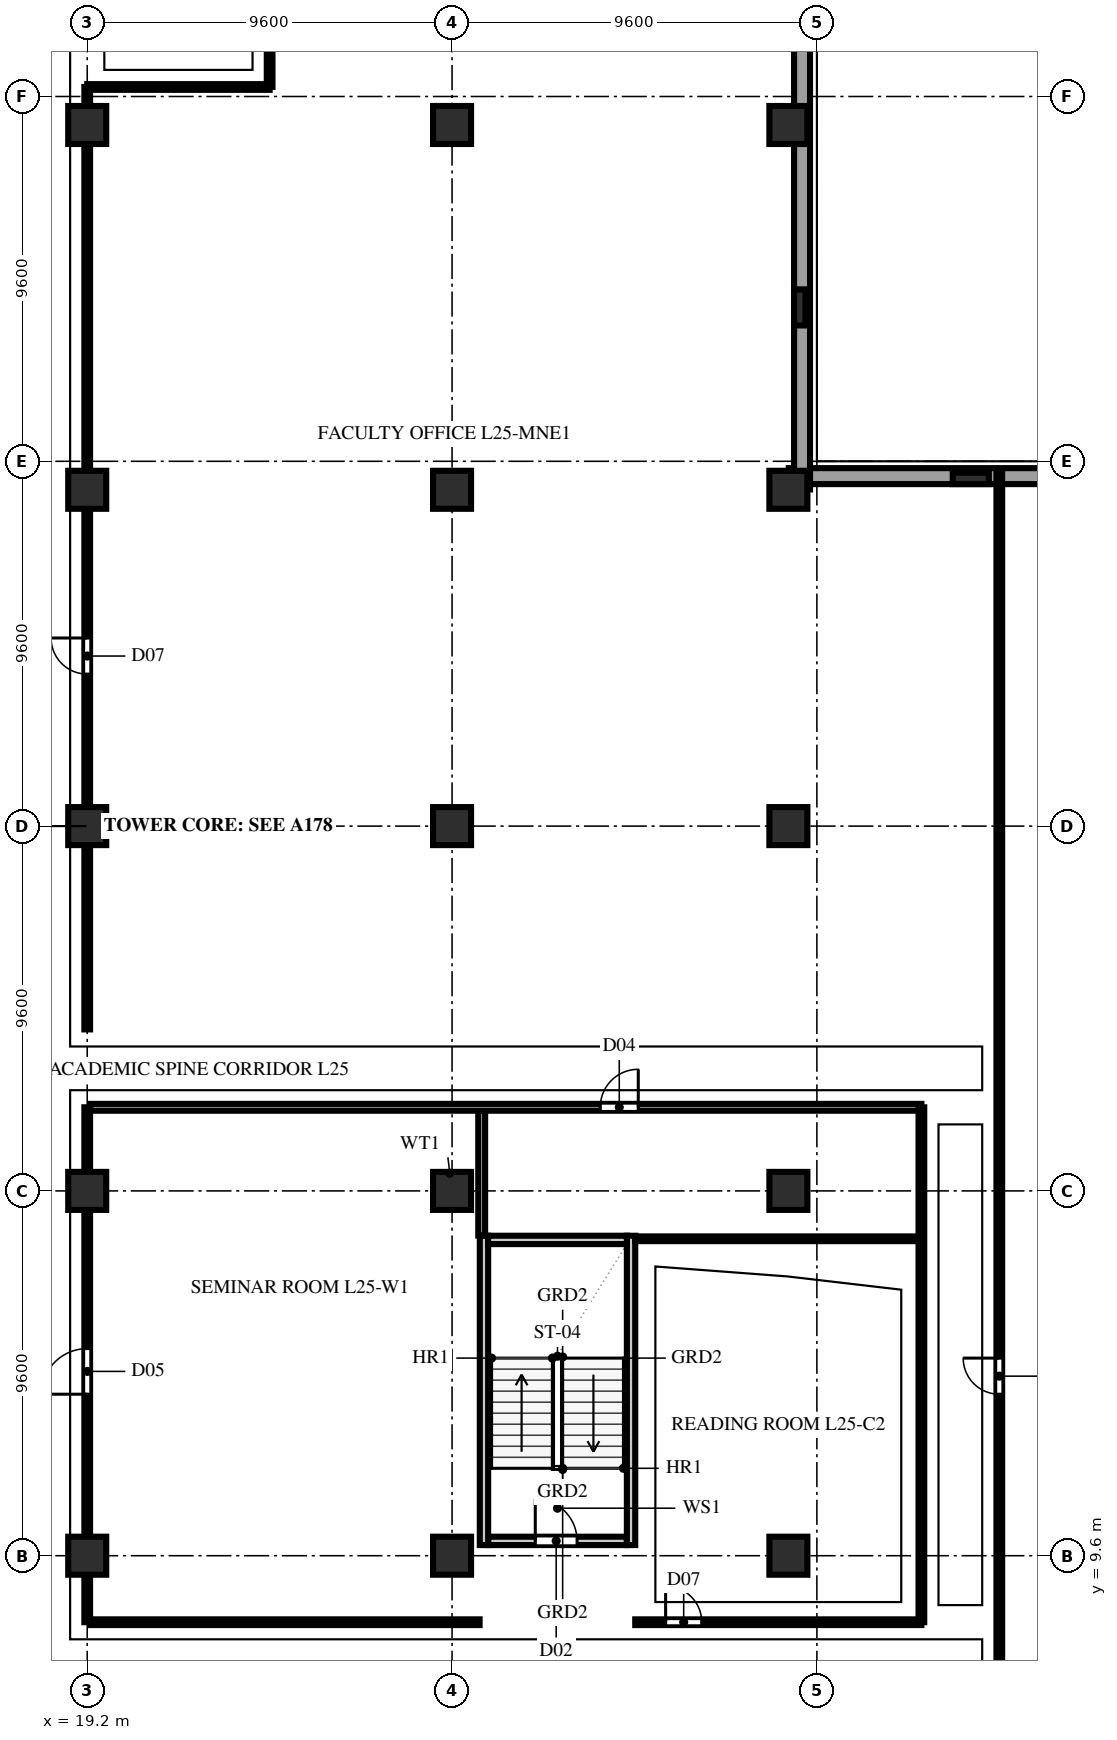
"""IFC4 building model, lengths in metres.
Left out: names, types, materials, properties, quantities, classifications, styles, units other than length and angle.
Written with IfcOpenShell. Run it as: python <this file> out.ifc"""

import sys

from ifc_helpers import new_model, si_unit, direction, frame, frame_2d, origin, origin_2d, place, context, subcontext, project, spatial, rectangle, extrude, element, fill, save


model = new_model("IFC4")
c1 = context("Model", 3, precision=1e-05, world=origin(), true_north=direction((0.0, 1.0)))
c2 = subcontext(c1, "Body", "Model", "MODEL_VIEW")
j1 = project(units=[si_unit("LENGTHUNIT", "METRE"), si_unit("PLANEANGLEUNIT", "RADIAN")], contexts=[c1])
p1 = place(None, origin())
s1 = spatial("IfcSite", under=j1, at=p1, CompositionType="ELEMENT")
p2 = place(p1, origin())
s2 = spatial("IfcBuilding", under=s1, at=p2, CompositionType="ELEMENT")
p3 = place(p2, frame((0.0, 0.0, 101.4)))
s3 = spatial("IfcBuildingStorey", under=s2, at=p3, CompositionType="ELEMENT", Elevation=101.4)
for number, where, z_axis, x_axis in (
    (1, (19.2, 9.6, 0.0), (0.0, 0.0, 1.0), (1.0, 0.0, 0.0)),
    (2, (19.2, 19.2, 0.0), (0.0, 0.0, 1.0), (1.0, 0.0, 0.0)),
    (3, (19.2, 28.8, 0.0), (0.0, 0.0, 1.0), (1.0, 0.0, 0.0)),
    (4, (19.2, 37.65, 0.0), (0.0, 0.0, 1.0), (1.0, 0.0, 0.0)),
    (5, (19.2, 47.25, 0.0), (0.0, 0.0, 1.0), (1.0, 0.0, 0.0)),
    (6, (28.8, 9.6, 0.0), (0.0, 0.0, 1.0), (1.0, 0.0, 0.0)),
    (7, (28.8, 19.2, 0.0), (0.0, 0.0, 1.0), (1.0, 0.0, 0.0)),
    (8, (28.8, 28.8, 0.0), (0.0, 0.0, 1.0), (1.0, 0.0, 0.0)),
    (9, (28.8, 37.65, 0.0), (0.0, 0.0, 1.0), (1.0, 0.0, 0.0)),
    (10, (28.8, 47.25, 0.0), (0.0, 0.0, 1.0), (1.0, 0.0, 0.0)),
    (11, (37.65, 9.6, 0.0), (0.0, 0.0, 1.0), (1.0, 0.0, 0.0)),
    (12, (37.65, 19.2, 0.0), (0.0, 0.0, 1.0), (1.0, 0.0, 0.0)),
    (13, (37.65, 28.8, 0.0), (0.0, 0.0, 1.0), (1.0, 0.0, 0.0)),
    (14, (37.65, 37.65, 0.0), (0.0, 0.0, 1.0), (1.0, 0.0, 0.0)),
    (15, (37.65, 47.25, 0.0), (0.0, 0.0, 1.0), (1.0, 0.0, 0.0)),
):
    element("IfcColumn", number, at=place(p3, frame(where, z_axis=z_axis, x_axis=x_axis)), inside=s3, PredefinedType="COLUMN", context=c2, shape_type="SweptSolid", body=[
        extrude(rectangle(XDim=1.0, YDim=1.0, at=origin_2d()), origin(), (0.0, 0.0, 1.0), 3.8),
    ])
for number, where, z_axis, x_axis in (
    (16, (37.95, 42.45, 0.0), (0.0, 0.0, 1.0), (0.0, 1.0, 0.0)),
    (17, (42.45, 37.95, 0.0), (0.0, 0.0, 1.0), (1.0, 0.0, 0.0)),
):
    element("IfcColumn", number, at=place(p3, frame(where, z_axis=z_axis, x_axis=x_axis)), inside=s3, PredefinedType="PILASTER", context=c2, shape_type="SweptSolid", body=[
        extrude(rectangle(XDim=0.95, YDim=0.3, at=origin_2d()), origin(), (0.0, 0.0, 1.0), 3.8),
    ])
p4 = place(p3, frame((55.76, 38.01, 0.0), z_axis=(0.0, 0.0, 1.0), x_axis=(-1.0, 0.0, 0.0)))
e18 = element("IfcWall", 18, at=p4, inside=s3, PredefinedType="SOLIDWALL", context=c2, shape_type="SweptSolid", body=[
    extrude(rectangle(XDim=18.1, YDim=0.42, at=frame_2d((9.05, 0.0))), origin(), (0.0, 0.0, 1.0), 3.54),
])
p5 = place(p3, frame((38.01, 37.66, 0.0), z_axis=(0.0, 0.0, 1.0), x_axis=(0.0, 1.0, 0.0)))
e19 = element("IfcWall", 19, at=p5, inside=s3, PredefinedType="SOLIDWALL", context=c2, shape_type="SweptSolid", body=[
    extrude(rectangle(XDim=27.7, YDim=0.42, at=frame_2d((13.85, 0.0))), origin(), (0.0, 0.0, 1.0), 3.54),
])
p6 = place(p3, frame((29.75, 9.99, 0.0), z_axis=(0.0, 0.0, 1.0), x_axis=(1.0, 0.0, 0.0)))
e20 = element("IfcWall", 20, at=p6, inside=s3, PredefinedType="SOLIDWALL", context=c2, shape_type="SweptSolid", body=[
    extrude(rectangle(XDim=3.65, YDim=0.22, at=frame_2d((1.825, 0.0))), origin(), (0.0, 0.0, 1.0), 3.54),
])
p7 = place(p6, frame((1.24, 0.0, 0.0)))
e21 = element("IfcOpeningElement", 21, at=p7, cuts=e20, PredefinedType="OPENING", context=c2, shape_type="SweptSolid", body=[
    extrude(rectangle(XDim=1.1, YDim=2.2, at=frame_2d((0.55, 1.1))), frame((0.0, 0.122, 0.0), z_axis=(0.0, -1.0, 0.0), x_axis=(1.0, 0.0, 0.0)), (0.0, 0.0, 1.0), 0.244),
])
for number, where, z_axis, x_axis in (
    (22, (29.64, 9.88, 0.0), (0.0, 0.0, 1.0), (0.0, 1.0, 0.0)),
    (23, (33.51, 9.88, 0.0), (0.0, 0.0, 1.0), (0.0, 1.0, 0.0)),
):
    element("IfcWall", number, at=place(p3, frame(where, z_axis=z_axis, x_axis=x_axis)), inside=s3, PredefinedType="SOLIDWALL", context=c2, shape_type="SweptSolid", body=[
        extrude(rectangle(XDim=8.14, YDim=0.22, at=frame_2d((4.07, 0.0))), origin(), (0.0, 0.0, 1.0), 3.54),
    ])
p8 = place(p3, frame((29.75, 17.91, 0.0), z_axis=(0.0, 0.0, 1.0), x_axis=(1.0, 0.0, 0.0)))
e24 = element("IfcWall", 24, at=p8, inside=s3, PredefinedType="SOLIDWALL", context=c2, shape_type="SweptSolid", body=[
    extrude(rectangle(XDim=3.65, YDim=0.22, at=frame_2d((1.825, 0.0))), origin(), (0.0, 0.0, 1.0), 3.54),
])
p9 = place(p3, frame((43.2, 0.22, 0.0), z_axis=(0.0, 0.0, 1.0), x_axis=(0.0, 1.0, 0.0)))
e25 = element("IfcWall", 25, at=p9, inside=s3, PredefinedType="PARTITIONING", context=c2, shape_type="SweptSolid", body=[
    extrude(rectangle(XDim=37.96, YDim=0.15, at=frame_2d((18.98, 0.0))), origin(), (0.0, 0.0, 1.0), 3.54),
])
p10 = place(p9, frame((13.63, 0.0, 0.0)))
e26 = element("IfcOpeningElement", 26, at=p10, cuts=e25, PredefinedType="OPENING", context=c2, shape_type="SweptSolid", body=[
    extrude(rectangle(XDim=0.95, YDim=2.15, at=frame_2d((0.475, 1.075))), frame((0.0, 0.087, 0.0), z_axis=(0.0, -1.0, 0.0), x_axis=(1.0, 0.0, 0.0)), (0.0, 0.0, 1.0), 0.174),
])
p11 = place(p3, frame((19.2, 7.85, 0.0), z_axis=(0.0, 0.0, 1.0), x_axis=(0.0, 1.0, 0.0)))
e27 = element("IfcWall", 27, at=p11, inside=s3, PredefinedType="PARTITIONING", context=c2, shape_type="SweptSolid", body=[
    extrude(rectangle(XDim=13.55, YDim=0.15, at=frame_2d((6.775, 0.0))), origin(), (0.0, 0.0, 1.0), 3.123),
])
p12 = place(p11, frame((6.0, 0.0, 0.0)))
e28 = element("IfcOpeningElement", 28, at=p12, cuts=e27, PredefinedType="OPENING", context=c2, shape_type="SweptSolid", body=[
    extrude(rectangle(XDim=1.2, YDim=2.2, at=frame_2d((0.6, 1.1))), frame((0.0, 0.087, 0.0), z_axis=(0.0, -1.0, 0.0), x_axis=(1.0, 0.0, 0.0)), (0.0, 0.0, 1.0), 0.174),
])
p13 = place(p3, frame((29.58, 18.025, 0.0), z_axis=(0.0, 0.0, 1.0), x_axis=(0.0, 1.0, 0.0)))
e29 = element("IfcWall", 29, at=p13, inside=s3, PredefinedType="PARTITIONING", context=c2, shape_type="SweptSolid", body=[
    extrude(rectangle(XDim=3.28, YDim=0.18, at=frame_2d((1.64, 0.0))), origin(), (0.0, 0.0, 1.0), 3.54),
])
p14 = place(p3, frame((19.28, 21.4, 0.0), z_axis=(0.0, 0.0, 1.0), x_axis=(1.0, 0.0, 0.0)))
e30 = element("IfcWall", 30, at=p14, inside=s3, PredefinedType="PARTITIONING", context=c2, shape_type="SweptSolid", body=[
    extrude(rectangle(XDim=21.87, YDim=0.18, at=frame_2d((10.935, 0.0))), origin(), (0.0, 0.0, 1.0), 3.54),
])
p15 = place(p14, frame((13.42, 0.0, 0.0)))
e31 = element("IfcOpeningElement", 31, at=p15, cuts=e30, PredefinedType="OPENING", context=c2, shape_type="SweptSolid", body=[
    extrude(rectangle(XDim=1.0, YDim=2.2, at=frame_2d((0.5, 1.1))), frame((0.0, 0.102, 0.0), z_axis=(0.0, -1.0, 0.0), x_axis=(1.0, 0.0, 0.0)), (0.0, 0.0, 1.0), 0.204),
])
p16 = place(p3, frame((19.28, 7.85, 0.0), z_axis=(0.0, 0.0, 1.0), x_axis=(1.0, 0.0, 0.0)))
e32 = element("IfcWall", 32, at=p16, inside=s3, PredefinedType="PARTITIONING", context=c2, shape_type="SweptSolid", body=[
    extrude(rectangle(XDim=10.245, YDim=0.15, at=frame_2d((5.123, 0.0))), origin(), (0.0, 0.0, 1.0), 3.54),
])
p17 = place(p3, frame((33.62, 17.94, 0.0), z_axis=(0.0, 0.0, 1.0), x_axis=(1.0, 0.0, 0.0)))
e33 = element("IfcWall", 33, at=p17, inside=s3, PredefinedType="PARTITIONING", context=c2, shape_type="SweptSolid", body=[
    extrude(rectangle(XDim=7.53, YDim=0.125, at=frame_2d((3.765, 0.0))), origin(), (0.0, 0.0, 1.0), 3.54),
])
p18 = place(p3, frame((33.62, 7.85, 0.0), z_axis=(0.0, 0.0, 1.0), x_axis=(1.0, 0.0, 0.0)))
e34 = element("IfcWall", 34, at=p18, inside=s3, PredefinedType="PARTITIONING", context=c2, shape_type="SweptSolid", body=[
    extrude(rectangle(XDim=7.53, YDim=0.15, at=frame_2d((3.765, 0.0))), origin(), (0.0, 0.0, 1.0), 3.54),
])
p19 = place(p18, frame((0.8, 0.0, 0.0)))
e35 = element("IfcOpeningElement", 35, at=p19, cuts=e34, PredefinedType="OPENING", context=c2, shape_type="SweptSolid", body=[
    extrude(rectangle(XDim=0.95, YDim=2.15, at=frame_2d((0.475, 1.075))), frame((0.0, 0.087, 0.0), z_axis=(0.0, -1.0, 0.0), x_axis=(1.0, 0.0, 0.0)), (0.0, 0.0, 1.0), 0.174),
])
p20 = place(p3, frame((41.15, 7.85, 0.0), z_axis=(0.0, 0.0, 1.0), x_axis=(0.0, 1.0, 0.0)))
e36 = element("IfcWall", 36, at=p20, inside=s3, PredefinedType="PARTITIONING", context=c2, shape_type="SweptSolid", body=[
    extrude(rectangle(XDim=13.55, YDim=0.15, at=frame_2d((6.775, 0.0))), origin(), (0.0, 0.0, 1.0), 3.54),
])
p21 = place(p3, frame((19.2, 23.45, 0.0), z_axis=(0.0, 0.0, 1.0), x_axis=(0.0, 1.0, 0.0)))
e37 = element("IfcWall", 37, at=p21, inside=s3, PredefinedType="PARTITIONING", context=c2, shape_type="SweptSolid", body=[
    extrude(rectangle(XDim=24.8, YDim=0.15, at=frame_2d((12.4, 0.0))), origin(), (0.0, 0.0, 1.0), 3.123),
])
p22 = place(p21, frame((9.35, 0.0, 0.0)))
e38 = element("IfcOpeningElement", 38, at=p22, cuts=e37, PredefinedType="OPENING", context=c2, shape_type="SweptSolid", body=[
    extrude(rectangle(XDim=0.95, YDim=2.15, at=frame_2d((0.475, 1.075))), frame((0.0, 0.087, 0.0), z_axis=(0.0, -1.0, 0.0), x_axis=(1.0, 0.0, 0.0)), (0.0, 0.0, 1.0), 0.174),
])
p23 = place(p3, frame((19.2, 48.25, 0.0), z_axis=(0.0, 0.0, 1.0), x_axis=(1.0, 0.0, 0.0)))
e39 = element("IfcWall", 39, at=p23, inside=s3, PredefinedType="PARTITIONING", context=c2, shape_type="SweptSolid", body=[
    extrude(rectangle(XDim=4.8, YDim=0.15, at=frame_2d((2.4, 0.0))), origin(), (0.0, 0.0, 1.0), 3.54),
])
p24 = place(p3, frame((24.0, 48.25, 0.0), z_axis=(0.0, 0.0, 1.0), x_axis=(0.0, 1.0, 0.0)))
e40 = element("IfcWall", 40, at=p24, inside=s3, PredefinedType="PARTITIONING", context=c2, shape_type="SweptSolid", body=[
    extrude(rectangle(XDim=18.11, YDim=0.15, at=frame_2d((9.055, 0.0))), origin(), (0.0, 0.0, 1.0), 3.133),
])
p25 = place(p24, frame((3.4, 0.0, 0.0)))
e41 = element("IfcOpeningElement", 41, at=p25, cuts=e40, PredefinedType="OPENING", context=c2, shape_type="SweptSolid", body=[
    extrude(rectangle(XDim=0.95, YDim=2.15, at=frame_2d((0.475, 1.075))), frame((0.0, 0.087, 0.0), z_axis=(0.0, -1.0, 0.0), x_axis=(1.0, 0.0, 0.0)), (0.0, 0.0, 1.0), 0.174),
])
p26 = place(p7, origin())
e42 = element("IfcDoor", 42, at=p26, inside=s3, OperationType="SINGLE_SWING_LEFT", PredefinedType="DOOR", context=c2, shape_type="SweptSolid", body=[
    extrude(rectangle(XDim=1.1, YDim=2.2, at=frame_2d((0.55, 1.1))), frame((0.0, 0.025, 0.0), z_axis=(0.0, -1.0, 0.0), x_axis=(1.0, 0.0, 0.0)), (0.0, 0.0, 1.0), 0.05),
])
fill(e21, e42)
p27 = place(p10, origin())
e43 = element("IfcDoor", 43, at=p27, inside=s3, OperationType="SINGLE_SWING_RIGHT", PredefinedType="DOOR", context=c2, shape_type="SweptSolid", body=[
    extrude(rectangle(XDim=0.95, YDim=2.15, at=frame_2d((0.475, 1.075))), frame((0.0, 0.025, 0.0), z_axis=(0.0, -1.0, 0.0), x_axis=(1.0, 0.0, 0.0)), (0.0, 0.0, 1.0), 0.05),
])
fill(e26, e43)
p28 = place(p12, origin())
e44 = element("IfcDoor", 44, at=p28, inside=s3, OperationType="SINGLE_SWING_LEFT", PredefinedType="DOOR", context=c2, shape_type="SweptSolid", body=[
    extrude(rectangle(XDim=1.2, YDim=2.2, at=frame_2d((0.6, 1.1))), frame((0.0, 0.025, 0.0), z_axis=(0.0, -1.0, 0.0), x_axis=(1.0, 0.0, 0.0)), (0.0, 0.0, 1.0), 0.05),
])
fill(e28, e44)
p29 = place(p15, origin())
e45 = element("IfcDoor", 45, at=p29, inside=s3, OperationType="SINGLE_SWING_RIGHT", PredefinedType="DOOR", context=c2, shape_type="SweptSolid", body=[
    extrude(rectangle(XDim=1.0, YDim=2.2, at=frame_2d((0.5, 1.1))), frame((0.0, 0.025, 0.0), z_axis=(0.0, -1.0, 0.0), x_axis=(1.0, 0.0, 0.0)), (0.0, 0.0, 1.0), 0.05),
])
fill(e31, e45)
p30 = place(p19, origin())
e46 = element("IfcDoor", 46, at=p30, inside=s3, OperationType="SINGLE_SWING_LEFT", PredefinedType="DOOR", context=c2, shape_type="SweptSolid", body=[
    extrude(rectangle(XDim=0.95, YDim=2.15, at=frame_2d((0.475, 1.075))), frame((0.0, 0.025, 0.0), z_axis=(0.0, -1.0, 0.0), x_axis=(1.0, 0.0, 0.0)), (0.0, 0.0, 1.0), 0.05),
])
fill(e35, e46)
p31 = place(p22, origin())
e47 = element("IfcDoor", 47, at=p31, inside=s3, OperationType="SINGLE_SWING_RIGHT", PredefinedType="DOOR", context=c2, shape_type="SweptSolid", body=[
    extrude(rectangle(XDim=0.95, YDim=2.15, at=frame_2d((0.475, 1.075))), frame((0.0, 0.025, 0.0), z_axis=(0.0, -1.0, 0.0), x_axis=(1.0, 0.0, 0.0)), (0.0, 0.0, 1.0), 0.05),
])
fill(e38, e47)
save(model, sys.argv[1])
